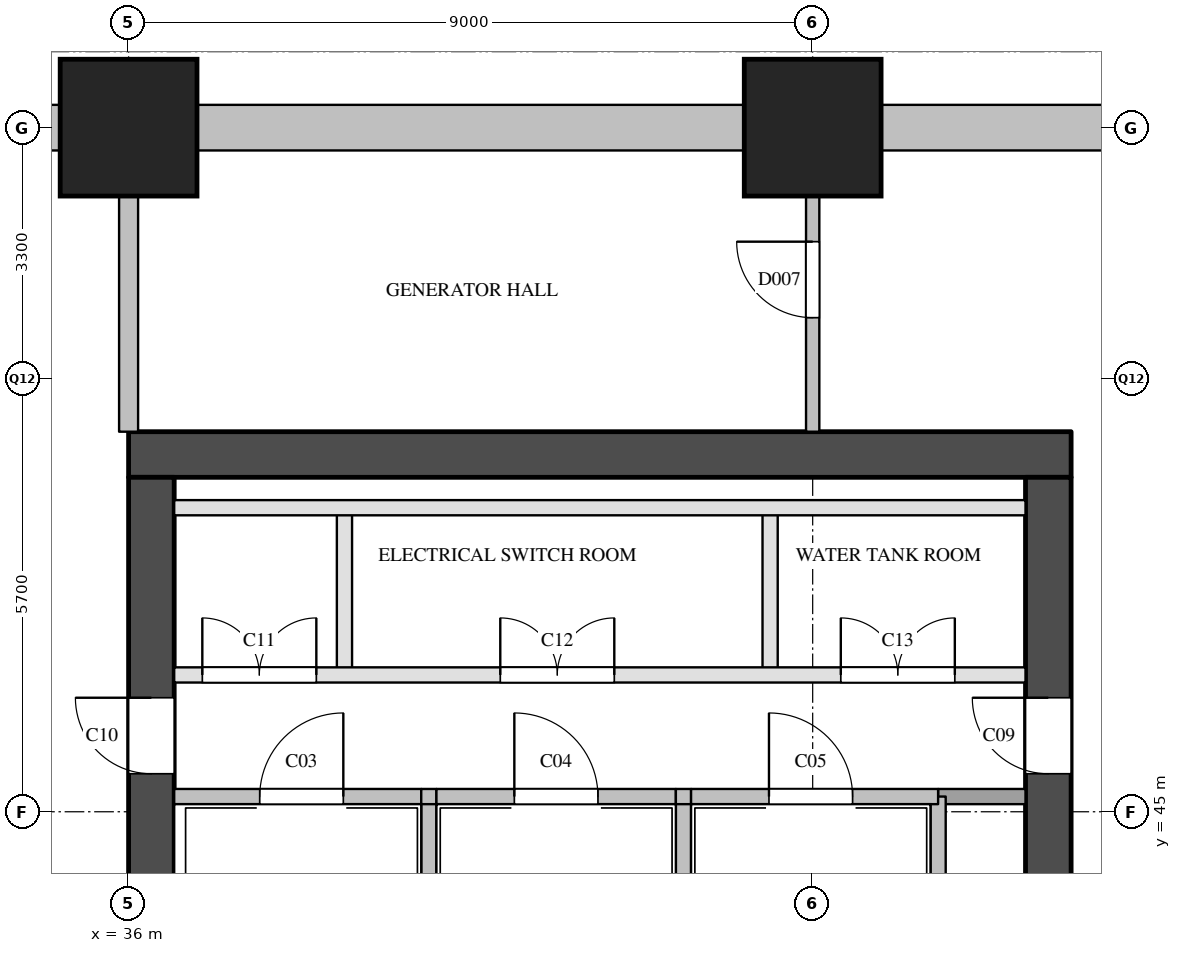
"""IFC4 building model, lengths in metres.
Left out: names, types, materials, properties, quantities, classifications, styles, units other than length and angle.
Written with IfcOpenShell. Run it as: python <this file> out.ifc"""

import sys

from ifc_helpers import new_model, si_unit, direction, frame, frame_2d, origin, origin_2d, place, context, subcontext, project, spatial, rectangle, extrude, element, fill, save


model = new_model("IFC4")
c1 = context("Model", 3, precision=1e-05, world=origin(), true_north=direction((0.0, 1.0)))
c2 = subcontext(c1, "Body", "Model", "MODEL_VIEW")
j1 = project(units=[si_unit("LENGTHUNIT", "METRE"), si_unit("PLANEANGLEUNIT", "RADIAN")], contexts=[c1])
p1 = place(None, origin())
s1 = spatial("IfcSite", under=j1, at=p1, CompositionType="ELEMENT")
p2 = place(p1, origin())
s2 = spatial("IfcBuilding", under=s1, at=p2, CompositionType="ELEMENT")
p3 = place(p2, frame((0.0, 0.0, -6.0)))
s3 = spatial("IfcBuildingStorey", under=s2, at=p3, CompositionType="ELEMENT", Elevation=-6.0)
for number, where, z_axis, x_axis in (
    (1, (36.0, 54.0, 0.0), (0.0, 0.0, 1.0), (1.0, 0.0, 0.0)),
    (2, (45.0, 54.0, 0.0), (0.0, 0.0, 1.0), (1.0, 0.0, 0.0)),
):
    element("IfcColumn", number, at=place(p3, frame(where, z_axis=z_axis, x_axis=x_axis)), inside=s3, PredefinedType="COLUMN", context=c2, shape_type="SweptSolid", body=[
        extrude(rectangle(XDim=1.8, YDim=1.8, at=origin_2d()), origin(), (0.0, 0.0, 1.0), 6.0),
    ])
p4 = place(p3, frame((49.5, 54.0, 0.0), z_axis=(0.0, 0.0, 1.0), x_axis=(-1.0, 0.0, 0.0)))
e3 = element("IfcWall", 3, at=p4, inside=s3, PredefinedType="SOLIDWALL", context=c2, shape_type="SweptSolid", body=[
    extrude(rectangle(XDim=3.6, YDim=0.6, at=frame_2d((1.8, 0.0))), origin(), (0.0, 0.0, 1.0), 5.59),
])
for number, where, z_axis, x_axis in (
    (4, (44.1, 54.0, 0.0), (0.0, 0.0, 1.0), (-1.0, 0.0, 0.0)),
    (5, (35.1, 54.0, 0.0), (0.0, 0.0, 1.0), (-1.0, 0.0, 0.0)),
):
    element("IfcWall", number, at=place(p3, frame(where, z_axis=z_axis, x_axis=x_axis)), inside=s3, PredefinedType="SOLIDWALL", context=c2, shape_type="SweptSolid", body=[
        extrude(rectangle(XDim=7.2, YDim=0.6, at=frame_2d((3.6, 0.0))), origin(), (0.0, 0.0, 1.0), 5.59),
    ])
p5 = place(p3, frame((36.0, 49.7, 0.0), z_axis=(0.0, 0.0, 1.0), x_axis=(1.0, 0.0, 0.0)))
e6 = element("IfcWall", 6, at=p5, inside=s3, PredefinedType="SHEAR", context=c2, shape_type="SweptSolid", body=[
    extrude(rectangle(XDim=12.4, YDim=0.6, at=frame_2d((6.2, 0.0))), origin(), (0.0, 0.0, 1.0), 5.59),
])
p6 = place(p3, frame((36.3, 29.1, 0.0), z_axis=(0.0, 0.0, 1.0), x_axis=(0.0, 1.0, 0.0)))
e7 = element("IfcWall", 7, at=p6, inside=s3, PredefinedType="SHEAR", context=c2, shape_type="SweptSolid", body=[
    extrude(rectangle(XDim=20.3, YDim=0.6, at=frame_2d((10.15, 0.0))), origin(), (0.0, 0.0, 1.0), 5.59),
])
p7 = place(p6, frame((16.4, 0.0, 0.0)))
e8 = element("IfcOpeningElement", 8, at=p7, cuts=e7, PredefinedType="OPENING", context=c2, shape_type="SweptSolid", body=[
    extrude(rectangle(XDim=1.0, YDim=2.1, at=frame_2d((0.5, 1.05))), frame((0.0, 0.31, 0.0), z_axis=(0.0, -1.0, 0.0), x_axis=(1.0, 0.0, 0.0)), (0.0, 0.0, 1.0), 0.62),
])
p8 = place(p3, frame((48.1, 29.1, 0.0), z_axis=(0.0, 0.0, 1.0), x_axis=(0.0, 1.0, 0.0)))
e9 = element("IfcWall", 9, at=p8, inside=s3, PredefinedType="SHEAR", context=c2, shape_type="SweptSolid", body=[
    extrude(rectangle(XDim=20.3, YDim=0.6, at=frame_2d((10.15, 0.0))), origin(), (0.0, 0.0, 1.0), 5.59),
])
p9 = place(p8, frame((12.5, 0.0, 0.0)))
e10 = element("IfcOpeningElement", 10, at=p9, cuts=e9, PredefinedType="OPENING", context=c2, shape_type="SweptSolid", body=[
    extrude(rectangle(XDim=0.7, YDim=2.1, at=frame_2d((0.35, 1.05))), frame((0.0, 0.31, 0.0), z_axis=(0.0, -1.0, 0.0), x_axis=(1.0, 0.0, 0.0)), (0.0, 0.0, 1.0), 0.62),
])
p10 = place(p8, frame((3.9, 0.0, 0.0)))
e11 = element("IfcOpeningElement", 11, at=p10, cuts=e9, PredefinedType="OPENING", context=c2, shape_type="SweptSolid", body=[
    extrude(rectangle(XDim=1.8, YDim=2.1, at=frame_2d((0.9, 1.05))), frame((0.0, 0.31, 0.0), z_axis=(0.0, -1.0, 0.0), x_axis=(1.0, 0.0, 0.0)), (0.0, 0.0, 1.0), 0.62),
])
p11 = place(p8, frame((16.4, 0.0, 0.0)))
e12 = element("IfcOpeningElement", 12, at=p11, cuts=e9, PredefinedType="OPENING", context=c2, shape_type="SweptSolid", body=[
    extrude(rectangle(XDim=1.0, YDim=2.1, at=frame_2d((0.5, 1.05))), frame((0.0, 0.31, 0.0), z_axis=(0.0, -1.0, 0.0), x_axis=(1.0, 0.0, 0.0)), (0.0, 0.0, 1.0), 0.62),
])
p12 = place(p3, frame((38.84, 46.8, 0.0), z_axis=(0.0, 0.0, 1.0), x_axis=(0.0, 1.0, 0.0)))
e13 = element("IfcWall", 13, at=p12, inside=s3, PredefinedType="PARTITIONING", context=c2, shape_type="SweptSolid", body=[
    extrude(rectangle(XDim=2.2, YDim=0.2, at=frame_2d((1.1, 0.0))), origin(), (0.0, 0.0, 1.0), 5.59),
])
for number, where, z_axis, x_axis in (
    (14, (39.95, 43.58, 0.0), (0.0, 0.0, 1.0), (0.0, 1.0, 0.0)),
    (15, (43.3, 43.58, 0.0), (0.0, 0.0, 1.0), (0.0, 1.0, 0.0)),
):
    element("IfcWall", number, at=place(p3, frame(where, z_axis=z_axis, x_axis=x_axis)), inside=s3, PredefinedType="SOLIDWALL", context=c2, shape_type="SweptSolid", body=[
        extrude(rectangle(XDim=1.62, YDim=0.2, at=frame_2d((0.81, 0.0))), origin(), (0.0, 0.0, 1.0), 5.59),
    ])
p13 = place(p3, frame((44.44, 46.8, 0.0), z_axis=(0.0, 0.0, 1.0), x_axis=(0.0, 1.0, 0.0)))
e16 = element("IfcWall", 16, at=p13, inside=s3, PredefinedType="PARTITIONING", context=c2, shape_type="SweptSolid", body=[
    extrude(rectangle(XDim=2.2, YDim=0.2, at=frame_2d((1.1, 0.0))), origin(), (0.0, 0.0, 1.0), 5.59),
])
p14 = place(p3, frame((46.65, 43.58, 0.0), z_axis=(0.0, 0.0, 1.0), x_axis=(0.0, 1.0, 0.0)))
e17 = element("IfcWall", 17, at=p14, inside=s3, PredefinedType="SOLIDWALL", context=c2, shape_type="SweptSolid", body=[
    extrude(rectangle(XDim=1.62, YDim=0.2, at=frame_2d((0.81, 0.0))), origin(), (0.0, 0.0, 1.0), 5.59),
])
p15 = place(p3, frame((46.65, 45.2, 0.0), z_axis=(0.0, 0.0, 1.0), x_axis=(1.0, 0.0, 0.0)))
e18 = element("IfcWall", 18, at=p15, inside=s3, PredefinedType="SOLIDWALL", context=c2, shape_type="SweptSolid", body=[
    extrude(rectangle(XDim=1.15, YDim=0.2, at=frame_2d((0.575, 0.0))), origin(), (0.0, 0.0, 1.0), 5.59),
])
p16 = place(p3, frame((36.6, 45.2, 0.0), z_axis=(0.0, 0.0, 1.0), x_axis=(1.0, 0.0, 0.0)))
e19 = element("IfcWall", 19, at=p16, inside=s3, PredefinedType="SOLIDWALL", context=c2, shape_type="SweptSolid", body=[
    extrude(rectangle(XDim=3.25, YDim=0.2, at=frame_2d((1.625, 0.0))), origin(), (0.0, 0.0, 1.0), 5.59),
])
p17 = place(p16, frame((1.125, 0.0, 0.0)))
e20 = element("IfcOpeningElement", 20, at=p17, cuts=e19, PredefinedType="OPENING", context=c2, shape_type="SweptSolid", body=[
    extrude(rectangle(XDim=1.1, YDim=2.1, at=frame_2d((0.55, 1.05))), frame((0.0, 0.11, 0.0), z_axis=(0.0, -1.0, 0.0), x_axis=(1.0, 0.0, 0.0)), (0.0, 0.0, 1.0), 0.22),
])
p18 = place(p3, frame((39.85, 45.2, 0.0), z_axis=(0.0, 0.0, 1.0), x_axis=(1.0, 0.0, 0.0)))
e21 = element("IfcWall", 21, at=p18, inside=s3, PredefinedType="SOLIDWALL", context=c2, shape_type="SweptSolid", body=[
    extrude(rectangle(XDim=0.2, YDim=0.2, at=frame_2d((0.1, 0.0))), origin(), (0.0, 0.0, 1.0), 5.59),
])
p19 = place(p3, frame((40.05, 45.2, 0.0), z_axis=(0.0, 0.0, 1.0), x_axis=(1.0, 0.0, 0.0)))
e22 = element("IfcWall", 22, at=p19, inside=s3, PredefinedType="SOLIDWALL", context=c2, shape_type="SweptSolid", body=[
    extrude(rectangle(XDim=3.15, YDim=0.2, at=frame_2d((1.575, 0.0))), origin(), (0.0, 0.0, 1.0), 5.59),
])
p20 = place(p19, frame((1.025, 0.0, 0.0)))
e23 = element("IfcOpeningElement", 23, at=p20, cuts=e22, PredefinedType="OPENING", context=c2, shape_type="SweptSolid", body=[
    extrude(rectangle(XDim=1.1, YDim=2.1, at=frame_2d((0.55, 1.05))), frame((0.0, 0.11, 0.0), z_axis=(0.0, -1.0, 0.0), x_axis=(1.0, 0.0, 0.0)), (0.0, 0.0, 1.0), 0.22),
])
p21 = place(p3, frame((43.2, 45.2, 0.0), z_axis=(0.0, 0.0, 1.0), x_axis=(1.0, 0.0, 0.0)))
e24 = element("IfcWall", 24, at=p21, inside=s3, PredefinedType="SOLIDWALL", context=c2, shape_type="SweptSolid", body=[
    extrude(rectangle(XDim=0.2, YDim=0.2, at=frame_2d((0.1, 0.0))), origin(), (0.0, 0.0, 1.0), 5.59),
])
p22 = place(p3, frame((43.4, 45.2, 0.0), z_axis=(0.0, 0.0, 1.0), x_axis=(1.0, 0.0, 0.0)))
e25 = element("IfcWall", 25, at=p22, inside=s3, PredefinedType="SOLIDWALL", context=c2, shape_type="SweptSolid", body=[
    extrude(rectangle(XDim=3.25, YDim=0.2, at=frame_2d((1.625, 0.0))), origin(), (0.0, 0.0, 1.0), 5.59),
])
p23 = place(p22, frame((1.025, 0.0, 0.0)))
e26 = element("IfcOpeningElement", 26, at=p23, cuts=e25, PredefinedType="OPENING", context=c2, shape_type="SweptSolid", body=[
    extrude(rectangle(XDim=1.1, YDim=2.1, at=frame_2d((0.55, 1.05))), frame((0.0, 0.11, 0.0), z_axis=(0.0, -1.0, 0.0), x_axis=(1.0, 0.0, 0.0)), (0.0, 0.0, 1.0), 0.22),
])
p24 = place(p3, frame((36.6, 46.8, 0.0), z_axis=(0.0, 0.0, 1.0), x_axis=(1.0, 0.0, 0.0)))
e27 = element("IfcWall", 27, at=p24, inside=s3, PredefinedType="PARTITIONING", context=c2, shape_type="SweptSolid", body=[
    extrude(rectangle(XDim=11.2, YDim=0.2, at=frame_2d((5.6, 0.0))), origin(), (0.0, 0.0, 1.0), 5.59),
])
p25 = place(p24, frame((0.37, 0.0, 0.0)))
e28 = element("IfcOpeningElement", 28, at=p25, cuts=e27, PredefinedType="OPENING", context=c2, shape_type="SweptSolid", body=[
    extrude(rectangle(XDim=1.5, YDim=2.1, at=frame_2d((0.75, 1.05))), frame((0.0, 0.11, 0.0), z_axis=(0.0, -1.0, 0.0), x_axis=(1.0, 0.0, 0.0)), (0.0, 0.0, 1.0), 0.22),
])
p26 = place(p24, frame((4.29, 0.0, 0.0)))
e29 = element("IfcOpeningElement", 29, at=p26, cuts=e27, PredefinedType="OPENING", context=c2, shape_type="SweptSolid", body=[
    extrude(rectangle(XDim=1.5, YDim=2.1, at=frame_2d((0.75, 1.05))), frame((0.0, 0.11, 0.0), z_axis=(0.0, -1.0, 0.0), x_axis=(1.0, 0.0, 0.0)), (0.0, 0.0, 1.0), 0.22),
])
p27 = place(p24, frame((8.77, 0.0, 0.0)))
e30 = element("IfcOpeningElement", 30, at=p27, cuts=e27, PredefinedType="OPENING", context=c2, shape_type="SweptSolid", body=[
    extrude(rectangle(XDim=1.5, YDim=2.1, at=frame_2d((0.75, 1.05))), frame((0.0, 0.11, 0.0), z_axis=(0.0, -1.0, 0.0), x_axis=(1.0, 0.0, 0.0)), (0.0, 0.0, 1.0), 0.22),
])
p28 = place(p3, frame((36.6, 49.0, 0.0), z_axis=(0.0, 0.0, 1.0), x_axis=(1.0, 0.0, 0.0)))
e31 = element("IfcWall", 31, at=p28, inside=s3, PredefinedType="PARTITIONING", context=c2, shape_type="SweptSolid", body=[
    extrude(rectangle(XDim=11.2, YDim=0.2, at=frame_2d((5.6, 0.0))), origin(), (0.0, 0.0, 1.0), 5.59),
])
p29 = place(p3, frame((45.0, 50.0, 0.0), z_axis=(0.0, 0.0, 1.0), x_axis=(0.0, 1.0, 0.0)))
e32 = element("IfcWall", 32, at=p29, inside=s3, PredefinedType="PARTITIONING", context=c2, shape_type="SweptSolid", body=[
    extrude(rectangle(XDim=4.0, YDim=0.175, at=frame_2d((2.0, 0.0))), origin(), (0.0, 0.0, 1.0), 5.59),
])
p30 = place(p29, frame((1.5, 0.0, 0.0)))
e33 = element("IfcOpeningElement", 33, at=p30, cuts=e32, PredefinedType="OPENING", context=c2, shape_type="SweptSolid", body=[
    extrude(rectangle(XDim=1.0, YDim=2.1, at=frame_2d((0.5, 1.05))), frame((0.0, 0.097, 0.0), z_axis=(0.0, -1.0, 0.0), x_axis=(1.0, 0.0, 0.0)), (0.0, 0.0, 1.0), 0.195),
])
p31 = place(p3, frame((36.0, 50.0, 0.0), z_axis=(0.0, 0.0, 1.0), x_axis=(0.0, 1.0, 0.0)))
e34 = element("IfcWall", 34, at=p31, inside=s3, PredefinedType="PARTITIONING", context=c2, shape_type="SweptSolid", body=[
    extrude(rectangle(XDim=4.0, YDim=0.25, at=frame_2d((2.0, 0.0))), origin(), (0.0, 0.0, 1.0), 5.59),
])
p32 = place(p17, origin())
e35 = element("IfcDoor", 35, at=p32, inside=s3, OperationType="SINGLE_SWING_RIGHT", PredefinedType="DOOR", context=c2, shape_type="SweptSolid", body=[
    extrude(rectangle(XDim=1.1, YDim=2.1, at=frame_2d((0.55, 1.05))), frame((0.0, 0.025, 0.0), z_axis=(0.0, -1.0, 0.0), x_axis=(1.0, 0.0, 0.0)), (0.0, 0.0, 1.0), 0.05),
])
fill(e20, e35)
p33 = place(p20, origin())
e36 = element("IfcDoor", 36, at=p33, inside=s3, OperationType="SINGLE_SWING_LEFT", PredefinedType="DOOR", context=c2, shape_type="SweptSolid", body=[
    extrude(rectangle(XDim=1.1, YDim=2.1, at=frame_2d((0.55, 1.05))), frame((0.0, 0.025, 0.0), z_axis=(0.0, -1.0, 0.0), x_axis=(1.0, 0.0, 0.0)), (0.0, 0.0, 1.0), 0.05),
])
fill(e23, e36)
p34 = place(p23, origin())
e37 = element("IfcDoor", 37, at=p34, inside=s3, OperationType="SINGLE_SWING_LEFT", PredefinedType="DOOR", context=c2, shape_type="SweptSolid", body=[
    extrude(rectangle(XDim=1.1, YDim=2.1, at=frame_2d((0.55, 1.05))), frame((0.0, 0.025, 0.0), z_axis=(0.0, -1.0, 0.0), x_axis=(1.0, 0.0, 0.0)), (0.0, 0.0, 1.0), 0.05),
])
fill(e26, e37)
p35 = place(p11, origin())
e38 = element("IfcDoor", 38, at=p35, inside=s3, OperationType="SINGLE_SWING_RIGHT", PredefinedType="DOOR", context=c2, shape_type="SweptSolid", body=[
    extrude(rectangle(XDim=1.0, YDim=2.1, at=frame_2d((0.5, 1.05))), frame((0.0, 0.025, 0.0), z_axis=(0.0, -1.0, 0.0), x_axis=(1.0, 0.0, 0.0)), (0.0, 0.0, 1.0), 0.05),
])
fill(e12, e38)
p36 = place(p7, origin())
e39 = element("IfcDoor", 39, at=p36, inside=s3, OperationType="SINGLE_SWING_RIGHT", PredefinedType="DOOR", context=c2, shape_type="SweptSolid", body=[
    extrude(rectangle(XDim=1.0, YDim=2.1, at=frame_2d((0.5, 1.05))), frame((0.0, 0.025, 0.0), z_axis=(0.0, -1.0, 0.0), x_axis=(1.0, 0.0, 0.0)), (0.0, 0.0, 1.0), 0.05),
])
fill(e8, e39)
p37 = place(p25, origin())
e40 = element("IfcDoor", 40, at=p37, inside=s3, OperationType="DOUBLE_DOOR_SINGLE_SWING", PredefinedType="DOOR", context=c2, shape_type="SweptSolid", body=[
    extrude(rectangle(XDim=1.5, YDim=2.1, at=frame_2d((0.75, 1.05))), frame((0.0, 0.025, 0.0), z_axis=(0.0, -1.0, 0.0), x_axis=(1.0, 0.0, 0.0)), (0.0, 0.0, 1.0), 0.05),
])
fill(e28, e40)
p38 = place(p26, origin())
e41 = element("IfcDoor", 41, at=p38, inside=s3, OperationType="DOUBLE_DOOR_SINGLE_SWING", PredefinedType="DOOR", context=c2, shape_type="SweptSolid", body=[
    extrude(rectangle(XDim=1.5, YDim=2.1, at=frame_2d((0.75, 1.05))), frame((0.0, 0.025, 0.0), z_axis=(0.0, -1.0, 0.0), x_axis=(1.0, 0.0, 0.0)), (0.0, 0.0, 1.0), 0.05),
])
fill(e29, e41)
p39 = place(p27, origin())
e42 = element("IfcDoor", 42, at=p39, inside=s3, OperationType="DOUBLE_DOOR_SINGLE_SWING", PredefinedType="DOOR", context=c2, shape_type="SweptSolid", body=[
    extrude(rectangle(XDim=1.5, YDim=2.1, at=frame_2d((0.75, 1.05))), frame((0.0, 0.025, 0.0), z_axis=(0.0, -1.0, 0.0), x_axis=(1.0, 0.0, 0.0)), (0.0, 0.0, 1.0), 0.05),
])
fill(e30, e42)
p40 = place(p30, origin())
e43 = element("IfcDoor", 43, at=p40, inside=s3, OperationType="SINGLE_SWING_RIGHT", PredefinedType="DOOR", context=c2, shape_type="SweptSolid", body=[
    extrude(rectangle(XDim=1.0, YDim=2.1, at=frame_2d((0.5, 1.05))), frame((0.0, 0.025, 0.0), z_axis=(0.0, -1.0, 0.0), x_axis=(1.0, 0.0, 0.0)), (0.0, 0.0, 1.0), 0.05),
])
fill(e33, e43)
save(model, sys.argv[1])
